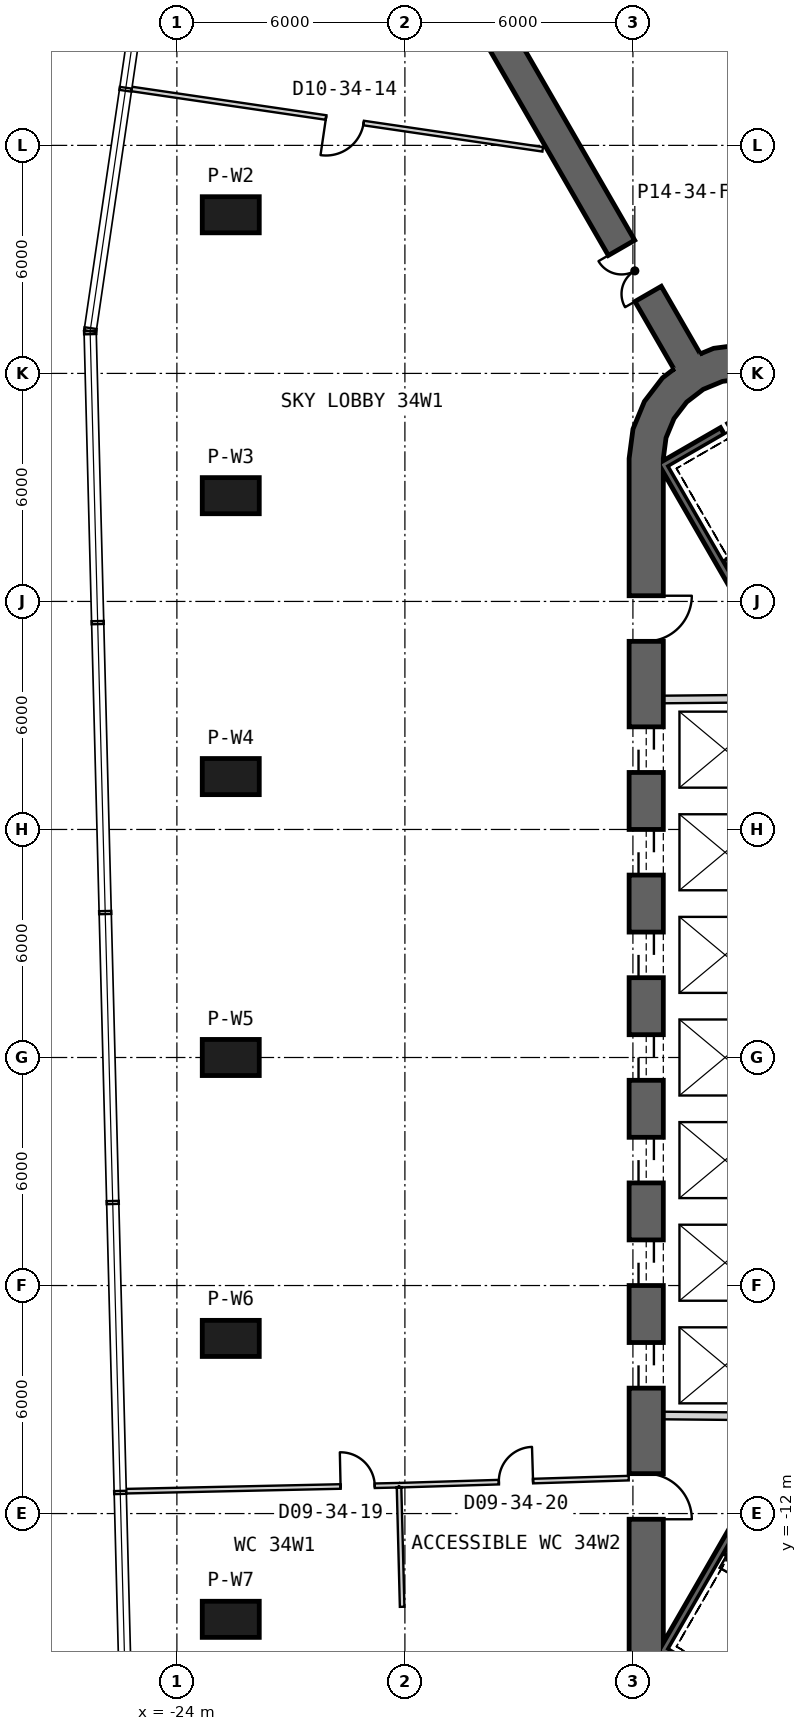
"""IFC4 building model, lengths in metres.
Left out: names, types, materials, properties, quantities, classifications, styles, units other than length and angle.
Written with IfcOpenShell. Run it as: python <this file> out.ifc"""

import sys

from ifc_helpers import new_model, si_unit, direction, frame, frame_2d, origin, origin_2d, place, context, subcontext, project, spatial, polyline, rectangle, outline, extrude, element, fill, save


model = new_model("IFC4")
c1 = context("Model", 3, precision=1e-05, world=origin(), true_north=direction((0.0, 1.0)))
c2 = subcontext(c1, "Body", "Model", "MODEL_VIEW")
j1 = project(units=[si_unit("LENGTHUNIT", "METRE"), si_unit("PLANEANGLEUNIT", "RADIAN")], contexts=[c1])
p1 = place(None, origin())
s1 = spatial("IfcSite", under=j1, at=p1, CompositionType="ELEMENT")
p2 = place(p1, origin())
s2 = spatial("IfcBuilding", under=s1, at=p2, CompositionType="ELEMENT")
p3 = place(p2, frame((0.0, 0.0, 156.2)))
s3 = spatial("IfcBuildingStorey", under=s2, at=p3, CompositionType="ELEMENT", Elevation=156.2)
for number, where, z_axis, x_axis in (
    (1, (-22.583, 22.174, 0.0), (0.0, 0.0, 1.0), (-1.0, 0.0, 0.0)),
    (2, (-22.583, 14.783, 0.0), (0.0, 0.0, 1.0), (-1.0, 0.0, 0.0)),
    (3, (-22.583, 7.391, 0.0), (0.0, 0.0, 1.0), (-1.0, 0.0, 0.0)),
    (4, (-22.583, 0.0, 0.0), (0.0, 0.0, 1.0), (-1.0, 0.0, 0.0)),
    (5, (-22.583, -7.391, 0.0), (0.0, 0.0, 1.0), (-1.0, 0.0, 0.0)),
    (6, (-22.583, -14.783, 0.0), (0.0, 0.0, 1.0), (-1.0, 0.0, 0.0)),
):
    element("IfcColumn", number, at=place(p3, frame(where, z_axis=z_axis, x_axis=x_axis)), inside=s3, PredefinedType="COLUMN", context=c2, shape_type="SweptSolid", body=[
        extrude(rectangle(XDim=1.5, YDim=0.95, at=origin_2d()), origin(), (0.0, 0.0, 1.0), 7.0),
    ])
p4 = place(p3, frame((-11.65, 15.762, 0.0), z_axis=(0.0, 0.0, 1.0), x_axis=(0.0, -1.0, 0.0)))
e7 = element("IfcWall", 7, at=p4, inside=s3, PredefinedType="SHEAR", context=c2, shape_type="SweptSolid", body=[
    extrude(rectangle(XDim=31.523, YDim=0.9, at=frame_2d((15.762, 0.0))), origin(), (0.0, 0.0, 1.0), 7.0),
])
p5 = place(p4, frame((7.062, 0.0, 0.0)))
e8 = element("IfcOpeningElement", 8, at=p5, cuts=e7, PredefinedType="OPENING", context=c2, shape_type="SweptSolid", body=[
    extrude(rectangle(XDim=1.2, YDim=2.4, at=frame_2d((0.6, 1.2))), frame((0.0, 0.46, 0.0), z_axis=(0.0, -1.0, 0.0), x_axis=(1.0, 0.0, 0.0)), (0.0, 0.0, 1.0), 0.92),
])
p6 = place(p4, frame((9.762, 0.0, 0.0)))
e9 = element("IfcOpeningElement", 9, at=p6, cuts=e7, PredefinedType="OPENING", context=c2, shape_type="SweptSolid", body=[
    extrude(rectangle(XDim=1.2, YDim=2.4, at=frame_2d((0.6, 1.2))), frame((0.0, 0.46, 0.0), z_axis=(0.0, -1.0, 0.0), x_axis=(1.0, 0.0, 0.0)), (0.0, 0.0, 1.0), 0.92),
])
p7 = place(p4, frame((12.462, 0.0, 0.0)))
e10 = element("IfcOpeningElement", 10, at=p7, cuts=e7, PredefinedType="OPENING", context=c2, shape_type="SweptSolid", body=[
    extrude(rectangle(XDim=1.2, YDim=2.4, at=frame_2d((0.6, 1.2))), frame((0.0, 0.46, 0.0), z_axis=(0.0, -1.0, 0.0), x_axis=(1.0, 0.0, 0.0)), (0.0, 0.0, 1.0), 0.92),
])
p8 = place(p4, frame((15.162, 0.0, 0.0)))
e11 = element("IfcOpeningElement", 11, at=p8, cuts=e7, PredefinedType="OPENING", context=c2, shape_type="SweptSolid", body=[
    extrude(rectangle(XDim=1.2, YDim=2.4, at=frame_2d((0.6, 1.2))), frame((0.0, 0.46, 0.0), z_axis=(0.0, -1.0, 0.0), x_axis=(1.0, 0.0, 0.0)), (0.0, 0.0, 1.0), 0.92),
])
p9 = place(p4, frame((17.862, 0.0, 0.0)))
e12 = element("IfcOpeningElement", 12, at=p9, cuts=e7, PredefinedType="OPENING", context=c2, shape_type="SweptSolid", body=[
    extrude(rectangle(XDim=1.2, YDim=2.4, at=frame_2d((0.6, 1.2))), frame((0.0, 0.46, 0.0), z_axis=(0.0, -1.0, 0.0), x_axis=(1.0, 0.0, 0.0)), (0.0, 0.0, 1.0), 0.92),
])
p10 = place(p4, frame((20.562, 0.0, 0.0)))
e13 = element("IfcOpeningElement", 13, at=p10, cuts=e7, PredefinedType="OPENING", context=c2, shape_type="SweptSolid", body=[
    extrude(rectangle(XDim=1.2, YDim=2.4, at=frame_2d((0.6, 1.2))), frame((0.0, 0.46, 0.0), z_axis=(0.0, -1.0, 0.0), x_axis=(1.0, 0.0, 0.0)), (0.0, 0.0, 1.0), 0.92),
])
p11 = place(p4, frame((23.262, 0.0, 0.0)))
e14 = element("IfcOpeningElement", 14, at=p11, cuts=e7, PredefinedType="OPENING", context=c2, shape_type="SweptSolid", body=[
    extrude(rectangle(XDim=1.2, YDim=2.4, at=frame_2d((0.6, 1.2))), frame((0.0, 0.46, 0.0), z_axis=(0.0, -1.0, 0.0), x_axis=(1.0, 0.0, 0.0)), (0.0, 0.0, 1.0), 0.92),
])
p12 = place(p4, frame((3.612, 0.0, 0.0)))
e15 = element("IfcOpeningElement", 15, at=p12, cuts=e7, PredefinedType="OPENING", context=c2, shape_type="SweptSolid", body=[
    extrude(rectangle(XDim=1.2, YDim=2.4, at=frame_2d((0.6, 1.2))), frame((0.0, 0.46, 0.0), z_axis=(0.0, -1.0, 0.0), x_axis=(1.0, 0.0, 0.0)), (0.0, 0.0, 1.0), 0.92),
])
p13 = place(p4, frame((26.712, 0.0, 0.0)))
e16 = element("IfcOpeningElement", 16, at=p13, cuts=e7, PredefinedType="OPENING", context=c2, shape_type="SweptSolid", body=[
    extrude(rectangle(XDim=1.2, YDim=2.4, at=frame_2d((0.6, 1.2))), frame((0.0, 0.46, 0.0), z_axis=(0.0, -1.0, 0.0), x_axis=(1.0, 0.0, 0.0)), (0.0, 0.0, 1.0), 0.92),
])
p14 = place(p3, origin())
e17 = element("IfcWall", 17, at=p14, inside=s3, PredefinedType="SHEAR", context=c2, shape_type="SweptSolid", body=[
    extrude(outline(polyline([(-7.6, 18.36), (-8.323, 18.659), (-9.1, 18.762), (-9.876, 18.659), (-10.6, 18.36), (-11.221, 17.883), (-11.698, 17.262), (-11.998, 16.538), (-12.1, 15.762), (-11.2, 15.762), (-11.128, 16.305), (-10.919, 16.812), (-10.585, 17.247), (-10.15, 17.58), (-9.644, 17.79), (-9.1, 17.862), (-8.556, 17.79), (-8.05, 17.58), (-7.6, 18.36)])), origin(), (0.0, 0.0, 1.0), 7.0),
])
p15 = place(p3, frame((-10.575, 18.316, 0.0), z_axis=(0.0, 0.0, 1.0), x_axis=(-0.500002326941, 0.86602406032, 0.0)))
e18 = element("IfcWall", 18, at=p15, inside=s3, PredefinedType="SHEAR", context=c2, shape_type="SweptSolid", body=[
    extrude(rectangle(XDim=12.384, YDim=0.8, at=frame_2d((6.192, 0.0))), origin(), (0.0, 0.0, 1.0), 7.0),
])
p16 = place(p15, frame((2.05, 0.0, 0.0)))
e19 = element("IfcOpeningElement", 19, at=p16, cuts=e18, PredefinedType="OPENING", context=c2, shape_type="SweptSolid", body=[
    extrude(rectangle(XDim=1.4, YDim=2.4, at=frame_2d((0.7, 1.2))), frame((0.0, 0.41, 0.0), z_axis=(0.0, -1.0, 0.0), x_axis=(1.0, 0.0, 0.0)), (0.0, 0.0, 1.0), 0.82),
])
p17 = place(p3, frame((-11.2, 9.42, 0.0), z_axis=(0.0, 0.0, 1.0), x_axis=(0.999957167047, 0.009255488683, 0.0)))
e20 = element("IfcWall", 20, at=p17, inside=s3, PredefinedType="PLUMBINGWALL", context=c2, shape_type="SweptSolid", body=[
    extrude(rectangle(XDim=3.35, YDim=0.2, at=frame_2d((1.675, 0.0))), origin(), (0.0, 0.0, 1.0), 6.65),
])
p18 = place(p3, frame((-8.05, -9.449, 0.0), z_axis=(0.0, 0.0, 1.0), x_axis=(-0.999957467379, 0.009222983926, 0.0)))
e21 = element("IfcWall", 21, at=p18, inside=s3, PredefinedType="PLUMBINGWALL", context=c2, shape_type="SweptSolid", body=[
    extrude(rectangle(XDim=3.15, YDim=0.2, at=frame_2d((1.575, 0.0))), origin(), (0.0, 0.0, 1.0), 6.65),
])
p19 = place(p3, frame((-11.245, 15.678, -0.35), z_axis=(0.0, 0.0, 1.0), x_axis=(0.499977274689, -0.866038523851, 0.0)))
e22 = element("IfcWall", 22, at=p19, inside=s3, PredefinedType="SHEAR", context=c2, shape_type="SweptSolid", body=[
    extrude(rectangle(XDim=8.1, YDim=0.2, at=frame_2d((4.05, 0.0))), origin(), (0.0, 0.0, 1.0), 7.0),
])
p20 = place(p3, frame((-9.645, 16.486, -0.35), z_axis=(0.0, 0.0, 1.0), x_axis=(-0.866038843867, -0.499976720371, 0.0)))
e23 = element("IfcWall", 23, at=p20, inside=s3, PredefinedType="SHEAR", context=c2, shape_type="SweptSolid", body=[
    extrude(rectangle(XDim=1.69, YDim=0.2, at=frame_2d((0.845, 0.0))), origin(), (0.0, 0.0, 1.0), 7.0),
])
p21 = place(p3, frame((-11.282, -15.541, -0.35), z_axis=(0.0, 0.0, 1.0), x_axis=(0.866000578957, -0.500042995397, 0.0)))
e24 = element("IfcWall", 24, at=p21, inside=s3, PredefinedType="SHEAR", context=c2, shape_type="SweptSolid", body=[
    extrude(rectangle(XDim=1.89, YDim=0.2, at=frame_2d((0.945, 0.0))), origin(), (0.0, 0.0, 1.0), 7.0),
])
p22 = place(p3, frame((-7.196, -8.663, -0.35), z_axis=(0.0, 0.0, 1.0), x_axis=(-0.499997992926, -0.866026562566, 0.0)))
e25 = element("IfcWall", 25, at=p22, inside=s3, PredefinedType="SHEAR", context=c2, shape_type="SweptSolid", body=[
    extrude(rectangle(XDim=7.9, YDim=0.2, at=frame_2d((3.95, 0.0))), origin(), (0.0, 0.0, 1.0), 7.0),
])
p23 = place(p3, frame((-14.374, 23.896, 0.0), z_axis=(0.0, 0.0, 1.0), x_axis=(-0.98939741422, 0.145233455974, 0.0)))
e26 = element("IfcWall", 26, at=p23, inside=s3, PredefinedType="PARTITIONING", context=c2, shape_type="SweptSolid", body=[
    extrude(rectangle(XDim=11.088, YDim=0.12, at=frame_2d((5.544, 0.0))), origin(), (0.0, 0.0, 1.0), 5.612),
])
p24 = place(p23, frame((4.762, 0.0, 0.0)))
e27 = element("IfcOpeningElement", 27, at=p24, cuts=e26, PredefinedType="OPENING", context=c2, shape_type="SweptSolid", body=[
    extrude(rectangle(XDim=1.0, YDim=2.1, at=frame_2d((0.5, 1.05))), frame((0.0, 0.07, 0.0), z_axis=(0.0, -1.0, 0.0), x_axis=(1.0, 0.0, 0.0)), (0.0, 0.0, 1.0), 0.14),
])
p25 = place(p3, frame((-25.491, -11.415, 0.0), z_axis=(0.0, 0.0, 1.0), x_axis=(0.999761030314, 0.021860518418, 0.0)))
e28 = element("IfcWall", 28, at=p25, inside=s3, PredefinedType="PARTITIONING", context=c2, shape_type="SweptSolid", body=[
    extrude(rectangle(XDim=7.337, YDim=0.12, at=frame_2d((3.669, 0.0))), origin(), (0.0, 0.0, 1.0), 5.612),
])
p26 = place(p25, frame((5.8, 0.0, 0.0)))
e29 = element("IfcOpeningElement", 29, at=p26, cuts=e28, PredefinedType="OPENING", context=c2, shape_type="SweptSolid", body=[
    extrude(rectangle(XDim=0.9, YDim=2.1, at=frame_2d((0.45, 1.05))), frame((0.0, 0.07, 0.0), z_axis=(0.0, -1.0, 0.0), x_axis=(1.0, 0.0, 0.0)), (0.0, 0.0, 1.0), 0.14),
])
p27 = place(p3, frame((-18.156, -11.254, 0.0), z_axis=(0.0, 0.0, 1.0), x_axis=(0.999523488274, 0.030867400097, 0.0)))
e30 = element("IfcWall", 30, at=p27, inside=s3, PredefinedType="PARTITIONING", context=c2, shape_type="SweptSolid", body=[
    extrude(rectangle(XDim=6.059, YDim=0.12, at=frame_2d((3.029, 0.0))), origin(), (0.0, 0.0, 1.0), 5.93),
])
p28 = place(p27, frame((2.63, 0.0, 0.0)))
e31 = element("IfcOpeningElement", 31, at=p28, cuts=e30, PredefinedType="OPENING", context=c2, shape_type="SweptSolid", body=[
    extrude(rectangle(XDim=0.9, YDim=2.1, at=frame_2d((0.45, 1.05))), frame((0.0, 0.07, 0.0), z_axis=(0.0, -1.0, 0.0), x_axis=(1.0, 0.0, 0.0)), (0.0, 0.0, 1.0), 0.14),
])
p29 = place(p3, frame((-18.073, -14.453, 0.0), z_axis=(0.0, 0.0, 1.0), x_axis=(-0.025969305079, 0.999662740725, 0.0)))
e32 = element("IfcWall", 32, at=p29, inside=s3, PredefinedType="PARTITIONING", context=c2, shape_type="SweptSolid", body=[
    extrude(rectangle(XDim=3.14, YDim=0.12, at=frame_2d((1.57, 0.0))), origin(), (0.0, 0.0, 1.0), 5.93),
])
p30 = place(p24, origin())
e33 = element("IfcDoor", 33, at=p30, inside=s3, OperationType="SINGLE_SWING_RIGHT", PredefinedType="NOTDEFINED", context=c2, shape_type="SweptSolid", body=[
    extrude(rectangle(XDim=1.0, YDim=2.1, at=frame_2d((0.5, 1.05))), frame((0.0, 0.025, 0.0), z_axis=(0.0, -1.0, 0.0), x_axis=(1.0, 0.0, 0.0)), (0.0, 0.0, 1.0), 0.05),
])
fill(e27, e33)
p31 = place(p26, origin())
e34 = element("IfcDoor", 34, at=p31, inside=s3, OperationType="SINGLE_SWING_LEFT", PredefinedType="NOTDEFINED", context=c2, shape_type="SweptSolid", body=[
    extrude(rectangle(XDim=0.9, YDim=2.1, at=frame_2d((0.45, 1.05))), frame((0.0, 0.025, 0.0), z_axis=(0.0, -1.0, 0.0), x_axis=(1.0, 0.0, 0.0)), (0.0, 0.0, 1.0), 0.05),
])
fill(e29, e34)
p32 = place(p28, origin())
e35 = element("IfcDoor", 35, at=p32, inside=s3, OperationType="SINGLE_SWING_RIGHT", PredefinedType="NOTDEFINED", context=c2, shape_type="SweptSolid", body=[
    extrude(rectangle(XDim=0.9, YDim=2.1, at=frame_2d((0.45, 1.05))), frame((0.0, 0.025, 0.0), z_axis=(0.0, -1.0, 0.0), x_axis=(1.0, 0.0, 0.0)), (0.0, 0.0, 1.0), 0.05),
])
fill(e31, e35)
p33 = place(p5, origin())
e36 = element("IfcDoor", 36, at=p33, inside=s3, OperationType="SLIDING_TO_LEFT", PredefinedType="USERDEFINED", context=c2, shape_type="SweptSolid", body=[
    extrude(rectangle(XDim=1.2, YDim=2.4, at=frame_2d((0.6, 1.2))), frame((0.0, 0.025, 0.0), z_axis=(0.0, -1.0, 0.0), x_axis=(1.0, 0.0, 0.0)), (0.0, 0.0, 1.0), 0.05),
])
fill(e8, e36)
p34 = place(p6, origin())
e37 = element("IfcDoor", 37, at=p34, inside=s3, OperationType="SLIDING_TO_LEFT", PredefinedType="USERDEFINED", context=c2, shape_type="SweptSolid", body=[
    extrude(rectangle(XDim=1.2, YDim=2.4, at=frame_2d((0.6, 1.2))), frame((0.0, 0.025, 0.0), z_axis=(0.0, -1.0, 0.0), x_axis=(1.0, 0.0, 0.0)), (0.0, 0.0, 1.0), 0.05),
])
fill(e9, e37)
p35 = place(p7, origin())
e38 = element("IfcDoor", 38, at=p35, inside=s3, OperationType="SLIDING_TO_LEFT", PredefinedType="USERDEFINED", context=c2, shape_type="SweptSolid", body=[
    extrude(rectangle(XDim=1.2, YDim=2.4, at=frame_2d((0.6, 1.2))), frame((0.0, 0.025, 0.0), z_axis=(0.0, -1.0, 0.0), x_axis=(1.0, 0.0, 0.0)), (0.0, 0.0, 1.0), 0.05),
])
fill(e10, e38)
p36 = place(p8, origin())
e39 = element("IfcDoor", 39, at=p36, inside=s3, OperationType="SLIDING_TO_LEFT", PredefinedType="USERDEFINED", context=c2, shape_type="SweptSolid", body=[
    extrude(rectangle(XDim=1.2, YDim=2.4, at=frame_2d((0.6, 1.2))), frame((0.0, 0.025, 0.0), z_axis=(0.0, -1.0, 0.0), x_axis=(1.0, 0.0, 0.0)), (0.0, 0.0, 1.0), 0.05),
])
fill(e11, e39)
p37 = place(p9, origin())
e40 = element("IfcDoor", 40, at=p37, inside=s3, OperationType="SLIDING_TO_LEFT", PredefinedType="USERDEFINED", context=c2, shape_type="SweptSolid", body=[
    extrude(rectangle(XDim=1.2, YDim=2.4, at=frame_2d((0.6, 1.2))), frame((0.0, 0.025, 0.0), z_axis=(0.0, -1.0, 0.0), x_axis=(1.0, 0.0, 0.0)), (0.0, 0.0, 1.0), 0.05),
])
fill(e12, e40)
p38 = place(p10, origin())
e41 = element("IfcDoor", 41, at=p38, inside=s3, OperationType="SLIDING_TO_LEFT", PredefinedType="USERDEFINED", context=c2, shape_type="SweptSolid", body=[
    extrude(rectangle(XDim=1.2, YDim=2.4, at=frame_2d((0.6, 1.2))), frame((0.0, 0.025, 0.0), z_axis=(0.0, -1.0, 0.0), x_axis=(1.0, 0.0, 0.0)), (0.0, 0.0, 1.0), 0.05),
])
fill(e13, e41)
p39 = place(p11, origin())
e42 = element("IfcDoor", 42, at=p39, inside=s3, OperationType="SLIDING_TO_LEFT", PredefinedType="USERDEFINED", context=c2, shape_type="SweptSolid", body=[
    extrude(rectangle(XDim=1.2, YDim=2.4, at=frame_2d((0.6, 1.2))), frame((0.0, 0.025, 0.0), z_axis=(0.0, -1.0, 0.0), x_axis=(1.0, 0.0, 0.0)), (0.0, 0.0, 1.0), 0.05),
])
fill(e14, e42)
p40 = place(p12, origin())
e43 = element("IfcDoor", 43, at=p40, inside=s3, OperationType="SINGLE_SWING_LEFT", PredefinedType="USERDEFINED", context=c2, shape_type="SweptSolid", body=[
    extrude(rectangle(XDim=1.2, YDim=2.4, at=frame_2d((0.6, 1.2))), frame((0.0, 0.025, 0.0), z_axis=(0.0, -1.0, 0.0), x_axis=(1.0, 0.0, 0.0)), (0.0, 0.0, 1.0), 0.05),
])
fill(e15, e43)
p41 = place(p13, origin())
e44 = element("IfcDoor", 44, at=p41, inside=s3, OperationType="SINGLE_SWING_RIGHT", PredefinedType="USERDEFINED", context=c2, shape_type="SweptSolid", body=[
    extrude(rectangle(XDim=1.2, YDim=2.4, at=frame_2d((0.6, 1.2))), frame((0.0, 0.025, 0.0), z_axis=(0.0, -1.0, 0.0), x_axis=(1.0, 0.0, 0.0)), (0.0, 0.0, 1.0), 0.05),
])
fill(e16, e44)
p42 = place(p16, origin())
e45 = element("IfcDoor", 45, at=p42, inside=s3, OperationType="DOUBLE_DOOR_SINGLE_SWING", PredefinedType="NOTDEFINED", context=c2, shape_type="SweptSolid", body=[
    extrude(rectangle(XDim=1.4, YDim=2.4, at=frame_2d((0.7, 1.2))), frame((0.0, 0.025, 0.0), z_axis=(0.0, -1.0, 0.0), x_axis=(1.0, 0.0, 0.0)), (0.0, 0.0, 1.0), 0.05),
])
fill(e19, e45)
save(model, sys.argv[1])
